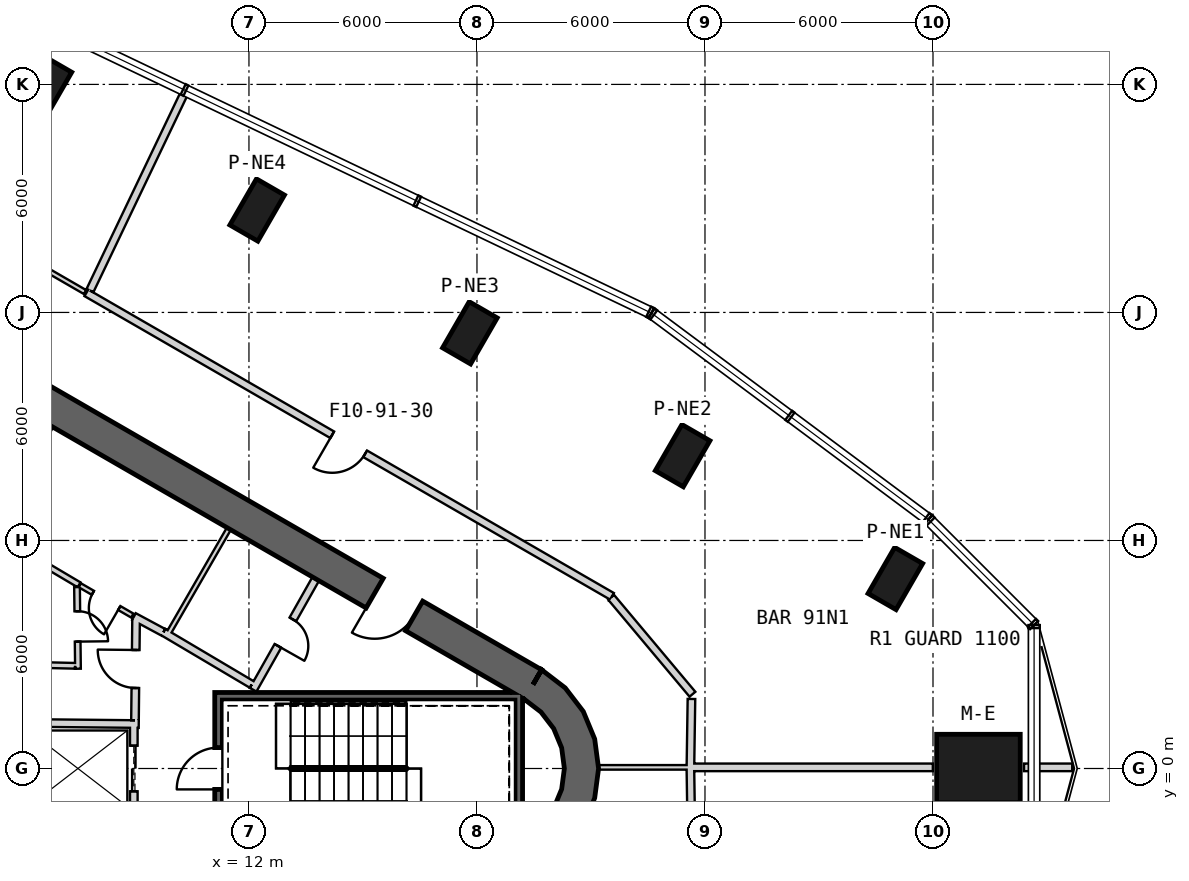
"""IFC4 building model, lengths in metres.
Left out: names, types, materials, properties, quantities, classifications, styles, units other than length and angle.
Written with IfcOpenShell. Run it as: python <this file> out.ifc"""

import sys

from ifc_helpers import new_model, si_unit, direction, frame, frame_2d, origin, origin_2d, place, context, subcontext, project, spatial, polyline, rectangle, outline, extrude, element, fill, save


model = new_model("IFC4")
c1 = context("Model", 3, precision=1e-05, world=origin(), true_north=direction((0.0, 1.0)))
c2 = subcontext(c1, "Body", "Model", "MODEL_VIEW")
j1 = project(units=[si_unit("LENGTHUNIT", "METRE"), si_unit("PLANEANGLEUNIT", "RADIAN")], contexts=[c1])
p1 = place(None, origin())
s1 = spatial("IfcSite", under=j1, at=p1, CompositionType="ELEMENT")
p2 = place(p1, origin())
s2 = spatial("IfcBuilding", under=s1, at=p2, CompositionType="ELEMENT")
p3 = place(p2, frame((0.0, 0.0, 398.3)))
s3 = spatial("IfcBuildingStorey", under=s2, at=p3, CompositionType="ELEMENT", Elevation=398.3)
p4 = place(p3, frame((31.196, 0.0, 0.0), z_axis=(0.0, 0.0, 1.0), x_axis=(1.0, 0.0, 0.0)))
e1 = element("IfcColumn", 1, at=p4, inside=s3, PredefinedType="COLUMN", context=c2, shape_type="SweptSolid", body=[
    extrude(rectangle(XDim=2.2, YDim=1.8, at=origin_2d()), origin(), (0.0, 0.0, 1.0), 6.5),
])
for number, where, z_axis, x_axis in (
    (2, (29.01, 4.999, 0.0), (0.0, 0.0, 1.0), (0.5, 0.866, 0.0)),
    (3, (23.412, 8.231, 0.0), (0.0, 0.0, 1.0), (0.5, 0.866, 0.0)),
):
    element("IfcColumn", number, at=place(p3, frame(where, z_axis=z_axis, x_axis=x_axis)), inside=s3, PredefinedType="COLUMN", context=c2, shape_type="SweptSolid", body=[
        extrude(rectangle(XDim=1.4, YDim=0.85, at=origin_2d()), origin(), (0.0, 0.0, 1.0), 6.5),
    ])
for number, where, z_axis, x_axis in (
    (4, (17.814, 11.463, -0.3), (0.0, 0.0, 1.0), (0.5, 0.866, 0.0)),
    (5, (12.216, 14.695, -0.3), (0.0, 0.0, 1.0), (0.5, 0.866, 0.0)),
    (6, (6.618, 17.927, -0.3), (0.0, 0.0, 1.0), (0.5, 0.866, 0.0)),
):
    element("IfcColumn", number, at=place(p3, frame(where, z_axis=z_axis, x_axis=x_axis)), inside=s3, PredefinedType="COLUMN", context=c2, shape_type="SweptSolid", body=[
        extrude(rectangle(XDim=1.4, YDim=0.85, at=origin_2d()), origin(), (0.0, 0.0, 1.0), 6.8),
    ])
p5 = place(p3, frame((19.475, 2.208, 0.0), z_axis=(0.0, 0.0, 1.0), x_axis=(-0.866028369851, 0.499994862586, 0.0)))
e7 = element("IfcWall", 7, at=p5, inside=s3, PredefinedType="SHEAR", context=c2, shape_type="SweptSolid", body=[
    extrude(rectangle(XDim=31.523, YDim=0.9, at=frame_2d((15.762, 0.0))), origin(), (0.0, 0.0, 1.0), 6.5),
])
p6 = place(p5, frame((3.612, 0.0, 0.0)))
e8 = element("IfcOpeningElement", 8, at=p6, cuts=e7, PredefinedType="OPENING", context=c2, shape_type="SweptSolid", body=[
    extrude(rectangle(XDim=1.2, YDim=2.4, at=frame_2d((0.6, 1.2))), frame((0.0, 0.46, 0.0), z_axis=(0.0, -1.0, 0.0), x_axis=(1.0, 0.0, 0.0)), (0.0, 0.0, 1.0), 0.92),
])
p7 = place(p5, frame((26.712, 0.0, 0.0)))
e9 = element("IfcOpeningElement", 9, at=p7, cuts=e7, PredefinedType="OPENING", context=c2, shape_type="SweptSolid", body=[
    extrude(rectangle(XDim=1.2, YDim=2.4, at=frame_2d((0.6, 1.2))), frame((0.0, 0.46, 0.0), z_axis=(0.0, -1.0, 0.0), x_axis=(1.0, 0.0, 0.0)), (0.0, 0.0, 1.0), 0.92),
])
p8 = place(p3, origin())
e10 = element("IfcWall", 10, at=p8, inside=s3, PredefinedType="SHEAR", context=c2, shape_type="SweptSolid", body=[
    extrude(outline(polyline([(19.7, -2.598), (20.321, -2.121), (20.798, -1.5), (21.098, -0.777), (21.2, 0.0), (21.098, 0.777), (20.798, 1.5), (20.321, 2.121), (19.7, 2.598), (19.25, 1.819), (19.685, 1.485), (20.019, 1.05), (20.229, 0.543), (20.3, 0.0), (20.229, -0.543), (20.019, -1.05), (19.685, -1.485), (19.25, -1.819), (19.7, -2.598)])), origin(), (0.0, 0.0, 1.0), 6.5),
])
p9 = place(p3, frame((19.2, 1.9, -0.3), z_axis=(0.0, 0.0, 1.0), x_axis=(-1.0, 0.0, 0.0)))
e11 = element("IfcWall", 11, at=p9, inside=s3, PredefinedType="SHEAR", context=c2, shape_type="SweptSolid", body=[
    extrude(rectangle(XDim=8.1, YDim=0.2, at=frame_2d((4.05, 0.0))), origin(), (0.0, 0.0, 1.0), 6.5),
])
p10 = place(p3, frame((19.1, -2.0, -0.3), z_axis=(0.0, 0.0, 1.0), x_axis=(0.0, 1.0, 0.0)))
e12 = element("IfcWall", 12, at=p10, inside=s3, PredefinedType="SHEAR", context=c2, shape_type="SweptSolid", body=[
    extrude(rectangle(XDim=3.8, YDim=0.2, at=frame_2d((1.9, 0.0))), origin(), (0.0, 0.0, 1.0), 6.5),
])
p11 = place(p3, frame((11.2, -1.8, -0.3), z_axis=(0.0, 0.0, 1.0), x_axis=(0.0, 1.0, 0.0)))
e13 = element("IfcWall", 13, at=p11, inside=s3, PredefinedType="SHEAR", context=c2, shape_type="SweptSolid", body=[
    extrude(rectangle(XDim=3.6, YDim=0.2, at=frame_2d((1.8, 0.0))), origin(), (0.0, 0.0, 1.0), 6.5),
])
p12 = place(p11, frame((1.25, 0.0, 0.3)))
e14 = element("IfcOpeningElement", 14, at=p12, cuts=e13, PredefinedType="OPENING", context=c2, shape_type="SweptSolid", body=[
    extrude(rectangle(XDim=1.1, YDim=2.1, at=frame_2d((0.55, 1.05))), frame((0.0, 0.11, 0.0), z_axis=(0.0, -1.0, 0.0), x_axis=(1.0, 0.0, 0.0)), (0.0, 0.0, 1.0), 0.22),
])
p13 = place(p3, frame((8.97, 1.2, 0.0), z_axis=(0.0, 0.0, 1.0), x_axis=(0.0, -1.0, 0.0)))
e15 = element("IfcWall", 15, at=p13, inside=s3, PredefinedType="PLUMBINGWALL", context=c2, shape_type="SweptSolid", body=[
    extrude(rectangle(XDim=2.4, YDim=0.2, at=frame_2d((1.2, 0.0))), origin(), (0.0, 0.0, 1.0), 6.2),
])
p14 = place(p13, frame((0.6, 0.0, 0.0)))
e16 = element("IfcOpeningElement", 16, at=p14, cuts=e15, PredefinedType="OPENING", context=c2, shape_type="SweptSolid", body=[
    extrude(rectangle(XDim=1.2, YDim=2.4, at=frame_2d((0.6, 1.2))), frame((0.0, 0.11, 0.0), z_axis=(0.0, -1.0, 0.0), x_axis=(1.0, 0.0, 0.0)), (0.0, 0.0, 1.0), 0.22),
])
p15 = place(p3, frame((9.1, 1.169, 0.0), z_axis=(0.0, 0.0, 1.0), x_axis=(-0.99994990606, 0.010009264196, 0.0)))
e17 = element("IfcWall", 17, at=p15, inside=s3, PredefinedType="PLUMBINGWALL", context=c2, shape_type="SweptSolid", body=[
    extrude(rectangle(XDim=3.0, YDim=0.2, at=frame_2d((1.5, 0.0))), origin(), (0.0, 0.0, 1.0), 6.2),
])
p16 = place(p3, frame((9.847, 3.495, 0.0), z_axis=(0.0, 0.0, 1.0), x_axis=(0.499984717929, 0.866034226713, 0.0)))
e18 = element("IfcWall", 18, at=p16, inside=s3, PredefinedType="PARTITIONING", context=c2, shape_type="SweptSolid", body=[
    extrude(rectangle(XDim=3.25, YDim=0.12, at=frame_2d((1.625, 0.0))), origin(), (0.0, 0.0, 1.0), 6.2),
])
p17 = place(p3, frame((12.11, 2.073, 0.0), z_axis=(0.0, 0.0, 1.0), x_axis=(0.49196600604, 0.870614408852, 0.0)))
e19 = element("IfcWall", 19, at=p17, inside=s3, PredefinedType="PARTITIONING", context=c2, shape_type="SweptSolid", body=[
    extrude(rectangle(XDim=3.35, YDim=0.2, at=frame_2d((1.675, 0.0))), origin(), (0.0, 0.0, 1.0), 6.2),
])
p18 = place(p17, frame((1.325, 0.0, 0.0)))
e20 = element("IfcOpeningElement", 20, at=p18, cuts=e19, PredefinedType="OPENING", context=c2, shape_type="SweptSolid", body=[
    extrude(rectangle(XDim=0.8, YDim=2.1, at=frame_2d((0.4, 1.05))), frame((0.0, 0.11, 0.0), z_axis=(0.0, -1.0, 0.0), x_axis=(1.0, 0.0, 0.0)), (0.0, 0.0, 1.0), 0.22),
])
p19 = place(p3, frame((9.75, 3.587, 0.0), z_axis=(0.0, 0.0, 1.0), x_axis=(0.860414880418, -0.509594185166, 0.0)))
e21 = element("IfcWall", 21, at=p19, inside=s3, PredefinedType="PARTITIONING", context=c2, shape_type="SweptSolid", body=[
    extrude(rectangle(XDim=2.7, YDim=0.2, at=frame_2d((1.35, 0.0))), origin(), (0.0, 0.0, 1.0), 6.2),
])
p20 = place(p3, frame((5.17, 6.195, 0.0), z_axis=(0.0, 0.0, 1.0), x_axis=(0.499984717929, 0.866034226713, 0.0)))
e22 = element("IfcWall", 22, at=p20, inside=s3, PredefinedType="PARTITIONING", context=c2, shape_type="SweptSolid", body=[
    extrude(rectangle(XDim=3.25, YDim=0.12, at=frame_2d((1.625, 0.0))), origin(), (0.0, 0.0, 1.0), 6.2),
])
p21 = place(p3, frame((8.974, 3.999, 0.0), z_axis=(0.0, 0.0, 1.0), x_axis=(0.880917147855, -0.473270513147, 0.0)))
e23 = element("IfcWall", 23, at=p21, inside=s3, PredefinedType="PARTITIONING", context=c2, shape_type="SweptSolid", body=[
    extrude(rectangle(XDim=0.878, YDim=0.2, at=frame_2d((0.439, 0.0))), origin(), (0.0, 0.0, 1.0), 6.2),
])
p22 = place(p3, frame((7.53, 4.833, 0.0), z_axis=(0.0, 0.0, 1.0), x_axis=(-0.860550523279, 0.509365091938, 0.0)))
e24 = element("IfcWall", 24, at=p22, inside=s3, PredefinedType="PLUMBINGWALL", context=c2, shape_type="SweptSolid", body=[
    extrude(rectangle(XDim=2.755, YDim=0.15, at=frame_2d((1.377, 0.0))), origin(), (0.0, 0.0, 1.0), 6.2),
])
p23 = place(p3, frame((7.55, 4.821, 0.0), z_axis=(0.0, 0.0, 1.0), x_axis=(0.866019818373, -0.500009674092, 0.0)))
e25 = element("IfcWall", 25, at=p23, inside=s3, PredefinedType="PARTITIONING", context=c2, shape_type="SweptSolid", body=[
    extrude(rectangle(XDim=1.594, YDim=0.12, at=frame_2d((0.797, 0.0))), origin(), (0.0, 0.0, 1.0), 6.2),
])
p24 = place(p23, frame((0.397, 0.0, 0.0)))
e26 = element("IfcOpeningElement", 26, at=p24, cuts=e25, PredefinedType="OPENING", context=c2, shape_type="SweptSolid", body=[
    extrude(rectangle(XDim=0.8, YDim=2.1, at=frame_2d((0.4, 1.05))), frame((0.0, 0.07, 0.0), z_axis=(0.0, -1.0, 0.0), x_axis=(1.0, 0.0, 0.0)), (0.0, 0.0, 1.0), 0.14),
])
p25 = place(p3, frame((9.001, 1.27, 0.0), z_axis=(0.0, 0.0, 1.0), x_axis=(0.010723968736, 0.999942496594, 0.0)))
e27 = element("IfcWall", 27, at=p25, inside=s3, PredefinedType="PARTITIONING", context=c2, shape_type="SweptSolid", body=[
    extrude(rectangle(XDim=2.709, YDim=0.2, at=frame_2d((1.354, 0.0))), origin(), (0.0, 0.0, 1.0), 6.2),
])
p26 = place(p25, frame((0.848, 0.0, 0.0)))
e28 = element("IfcOpeningElement", 28, at=p26, cuts=e27, PredefinedType="OPENING", context=c2, shape_type="SweptSolid", body=[
    extrude(rectangle(XDim=1.0, YDim=2.1, at=frame_2d((0.5, 1.05))), frame((0.0, 0.11, 0.0), z_axis=(0.0, -1.0, 0.0), x_axis=(1.0, 0.0, 0.0)), (0.0, 0.0, 1.0), 0.22),
])
p27 = place(p3, frame((7.501, 2.625, 0.0), z_axis=(0.0, 0.0, 1.0), x_axis=(-0.011799927307, 0.999930378434, 0.0)))
e29 = element("IfcWall", 29, at=p27, inside=s3, PredefinedType="PLUMBINGWALL", context=c2, shape_type="SweptSolid", body=[
    extrude(rectangle(XDim=2.152, YDim=0.15, at=frame_2d((1.076, 0.0))), origin(), (0.0, 0.0, 1.0), 6.2),
])
p28 = place(p27, frame((0.713, 0.0, 0.0)))
e30 = element("IfcOpeningElement", 30, at=p28, cuts=e29, PredefinedType="OPENING", context=c2, shape_type="SweptSolid", body=[
    extrude(rectangle(XDim=0.8, YDim=2.1, at=frame_2d((0.4, 1.05))), frame((0.0, 0.085, 0.0), z_axis=(0.0, -1.0, 0.0), x_axis=(1.0, 0.0, 0.0)), (0.0, 0.0, 1.0), 0.17),
])
p29 = place(p3, frame((6.249, 2.729, 0.0), z_axis=(0.0, 0.0, 1.0), x_axis=(0.999719957279, -0.023664467427, 0.0)))
e31 = element("IfcWall", 31, at=p29, inside=s3, PredefinedType="PLUMBINGWALL", context=c2, shape_type="SweptSolid", body=[
    extrude(rectangle(XDim=1.176, YDim=0.15, at=frame_2d((0.588, 0.0))), origin(), (0.0, 0.0, 1.0), 6.2),
])
p30 = place(p3, frame((21.552, 4.531, 0.0), z_axis=(0.0, 0.0, 1.0), x_axis=(-0.86602469383, 0.500001229675, 0.0)))
e32 = element("IfcWall", 32, at=p30, inside=s3, PredefinedType="PARTITIONING", context=c2, shape_type="SweptSolid", body=[
    extrude(rectangle(XDim=15.97, YDim=0.2, at=frame_2d((7.985, 0.0))), origin(), (0.0, 0.0, 1.0), 5.57),
])
p31 = place(p30, frame((7.5, 0.0, 0.0)))
e33 = element("IfcOpeningElement", 33, at=p31, cuts=e32, PredefinedType="OPENING", context=c2, shape_type="SweptSolid", body=[
    extrude(rectangle(XDim=1.0, YDim=2.1, at=frame_2d((0.5, 1.05))), frame((0.0, 0.11, 0.0), z_axis=(0.0, -1.0, 0.0), x_axis=(1.0, 0.0, 0.0)), (0.0, 0.0, 1.0), 0.22),
])
p32 = place(p3, frame((23.67, 1.954, 0.0), z_axis=(0.0, 0.0, 1.0), x_axis=(-0.642784432045, 0.766047109466, 0.0)))
e34 = element("IfcWall", 34, at=p32, inside=s3, PredefinedType="PARTITIONING", context=c2, shape_type="SweptSolid", body=[
    extrude(rectangle(XDim=3.33, YDim=0.2, at=frame_2d((1.665, 0.0))), origin(), (0.0, 0.0, 1.0), 5.57),
])
p33 = place(p3, frame((23.616, 0.0, 0.0), z_axis=(0.0, 0.0, 1.0), x_axis=(0.015079027421, 0.999886305003, 0.0)))
e35 = element("IfcWall", 35, at=p33, inside=s3, PredefinedType="PARTITIONING", context=c2, shape_type="SweptSolid", body=[
    extrude(rectangle(XDim=1.83, YDim=0.2, at=frame_2d((0.915, 0.0))), origin(), (0.0, 0.0, 1.0), 5.57),
])
p34 = place(p3, frame((7.687, 12.536, 0.0), z_axis=(0.0, 0.0, 1.0), x_axis=(-0.866029110027, 0.499993580544, 0.0)))
e36 = element("IfcWall", 36, at=p34, inside=s3, PredefinedType="PARTITIONING", context=c2, shape_type="SweptSolid", body=[
    extrude(rectangle(XDim=16.629, YDim=0.12, at=frame_2d((8.314, 0.0))), origin(), (0.0, 0.0, 1.0), 5.57),
])
p35 = place(p34, frame((7.732, 0.0, 0.0)))
e37 = element("IfcOpeningElement", 37, at=p35, cuts=e36, PredefinedType="OPENING", context=c2, shape_type="SweptSolid", body=[
    extrude(rectangle(XDim=1.0, YDim=2.1, at=frame_2d((0.5, 1.05))), frame((0.0, 0.07, 0.0), z_axis=(0.0, -1.0, 0.0), x_axis=(1.0, 0.0, 0.0)), (0.0, 0.0, 1.0), 0.14),
])
p36 = place(p3, frame((23.646, 0.03, 0.0), z_axis=(0.0, 0.0, 1.0), x_axis=(-1.0, 0.0, 0.0)))
e38 = element("IfcWall", 38, at=p36, inside=s3, PredefinedType="PARTITIONING", context=c2, shape_type="SweptSolid", body=[
    extrude(rectangle(XDim=2.6, YDim=0.12, at=frame_2d((1.3, 0.0))), origin(), (0.0, 0.0, 1.0), 5.57),
])
p37 = place(p3, frame((7.817, 12.576, 0.0), z_axis=(0.0, 0.0, 1.0), x_axis=(0.43107042423, 0.902318286058, 0.0)))
e39 = element("IfcWall", 39, at=p37, inside=s3, PredefinedType="PARTITIONING", context=c2, shape_type="SweptSolid", body=[
    extrude(rectangle(XDim=5.833, YDim=0.2, at=frame_2d((2.917, 0.0))), origin(), (0.0, 0.0, 1.0), 6.2),
])
p38 = place(p3, frame((23.646, 0.03, 0.0), z_axis=(0.0, 0.0, 1.0), x_axis=(1.0, 0.0, 0.0)))
e40 = element("IfcWall", 40, at=p38, inside=s3, PredefinedType="PARTITIONING", context=c2, shape_type="SweptSolid", body=[
    extrude(rectangle(XDim=6.349, YDim=0.2, at=frame_2d((3.175, 0.0))), origin(), (0.0, 0.0, 1.0), 5.57),
])
p39 = place(p3, frame((32.396, 0.03, 0.0), z_axis=(0.0, 0.0, 1.0), x_axis=(1.0, 0.0, 0.0)))
e41 = element("IfcWall", 41, at=p39, inside=s3, PredefinedType="PARTITIONING", context=c2, shape_type="SweptSolid", body=[
    extrude(rectangle(XDim=1.268, YDim=0.2, at=frame_2d((0.634, 0.0))), origin(), (0.0, 0.0, 1.0), 6.2),
])
p40 = place(p3, frame((23.647, -2.02, 0.0), z_axis=(0.0, 0.0, 1.0), x_axis=(-0.015109493549, 0.999885845087, 0.0)))
e42 = element("IfcWall", 42, at=p40, inside=s3, PredefinedType="PARTITIONING", context=c2, shape_type="SweptSolid", body=[
    extrude(rectangle(XDim=2.02, YDim=0.2, at=frame_2d((1.01, 0.0))), origin(), (0.0, 0.0, 1.0), 5.57),
])
p41 = place(p12, origin())
e43 = element("IfcDoor", 43, at=p41, inside=s3, OperationType="SINGLE_SWING_LEFT", PredefinedType="USERDEFINED", context=c2, shape_type="SweptSolid", body=[
    extrude(rectangle(XDim=1.1, YDim=2.1, at=frame_2d((0.55, 1.05))), frame((0.0, 0.025, 0.0), z_axis=(0.0, -1.0, 0.0), x_axis=(1.0, 0.0, 0.0)), (0.0, 0.0, 1.0), 0.05),
])
fill(e14, e43)
p42 = place(p26, origin())
e44 = element("IfcDoor", 44, at=p42, inside=s3, OperationType="SINGLE_SWING_RIGHT", PredefinedType="USERDEFINED", context=c2, shape_type="SweptSolid", body=[
    extrude(rectangle(XDim=1.0, YDim=2.1, at=frame_2d((0.5, 1.05))), frame((0.0, 0.025, 0.0), z_axis=(0.0, -1.0, 0.0), x_axis=(1.0, 0.0, 0.0)), (0.0, 0.0, 1.0), 0.05),
])
fill(e28, e44)
p43 = place(p14, origin())
e45 = element("IfcDoor", 45, at=p43, inside=s3, OperationType="SLIDING_TO_LEFT", PredefinedType="USERDEFINED", context=c2, shape_type="SweptSolid", body=[
    extrude(rectangle(XDim=1.2, YDim=2.4, at=frame_2d((0.6, 1.2))), frame((0.0, 0.025, 0.0), z_axis=(0.0, -1.0, 0.0), x_axis=(1.0, 0.0, 0.0)), (0.0, 0.0, 1.0), 0.05),
])
fill(e16, e45)
p44 = place(p28, origin())
e46 = element("IfcDoor", 46, at=p44, inside=s3, OperationType="SINGLE_SWING_LEFT", PredefinedType="USERDEFINED", context=c2, shape_type="SweptSolid", body=[
    extrude(rectangle(XDim=0.8, YDim=2.1, at=frame_2d((0.4, 1.05))), frame((0.0, 0.025, 0.0), z_axis=(0.0, -1.0, 0.0), x_axis=(1.0, 0.0, 0.0)), (0.0, 0.0, 1.0), 0.05),
])
fill(e30, e46)
p45 = place(p18, origin())
e47 = element("IfcDoor", 47, at=p45, inside=s3, OperationType="SINGLE_SWING_LEFT", PredefinedType="USERDEFINED", context=c2, shape_type="SweptSolid", body=[
    extrude(rectangle(XDim=0.8, YDim=2.1, at=frame_2d((0.4, 1.05))), frame((0.0, 0.025, 0.0), z_axis=(0.0, -1.0, 0.0), x_axis=(1.0, 0.0, 0.0)), (0.0, 0.0, 1.0), 0.05),
])
fill(e20, e47)
p46 = place(p24, origin())
e48 = element("IfcDoor", 48, at=p46, inside=s3, OperationType="SINGLE_SWING_RIGHT", PredefinedType="USERDEFINED", context=c2, shape_type="SweptSolid", body=[
    extrude(rectangle(XDim=0.8, YDim=2.1, at=frame_2d((0.4, 1.05))), frame((0.0, 0.025, 0.0), z_axis=(0.0, -1.0, 0.0), x_axis=(1.0, 0.0, 0.0)), (0.0, 0.0, 1.0), 0.05),
])
fill(e26, e48)
p47 = place(p31, origin())
e49 = element("IfcDoor", 49, at=p47, inside=s3, OperationType="SINGLE_SWING_RIGHT", PredefinedType="USERDEFINED", context=c2, shape_type="SweptSolid", body=[
    extrude(rectangle(XDim=1.0, YDim=2.1, at=frame_2d((0.5, 1.05))), frame((0.0, 0.025, 0.0), z_axis=(0.0, -1.0, 0.0), x_axis=(1.0, 0.0, 0.0)), (0.0, 0.0, 1.0), 0.05),
])
fill(e33, e49)
p48 = place(p6, origin())
e50 = element("IfcDoor", 50, at=p48, inside=s3, OperationType="SINGLE_SWING_RIGHT", PredefinedType="USERDEFINED", context=c2, shape_type="SweptSolid", body=[
    extrude(rectangle(XDim=1.2, YDim=2.4, at=frame_2d((0.6, 1.2))), frame((0.0, 0.025, 0.0), z_axis=(0.0, -1.0, 0.0), x_axis=(1.0, 0.0, 0.0)), (0.0, 0.0, 1.0), 0.05),
])
fill(e8, e50)
save(model, sys.argv[1])
